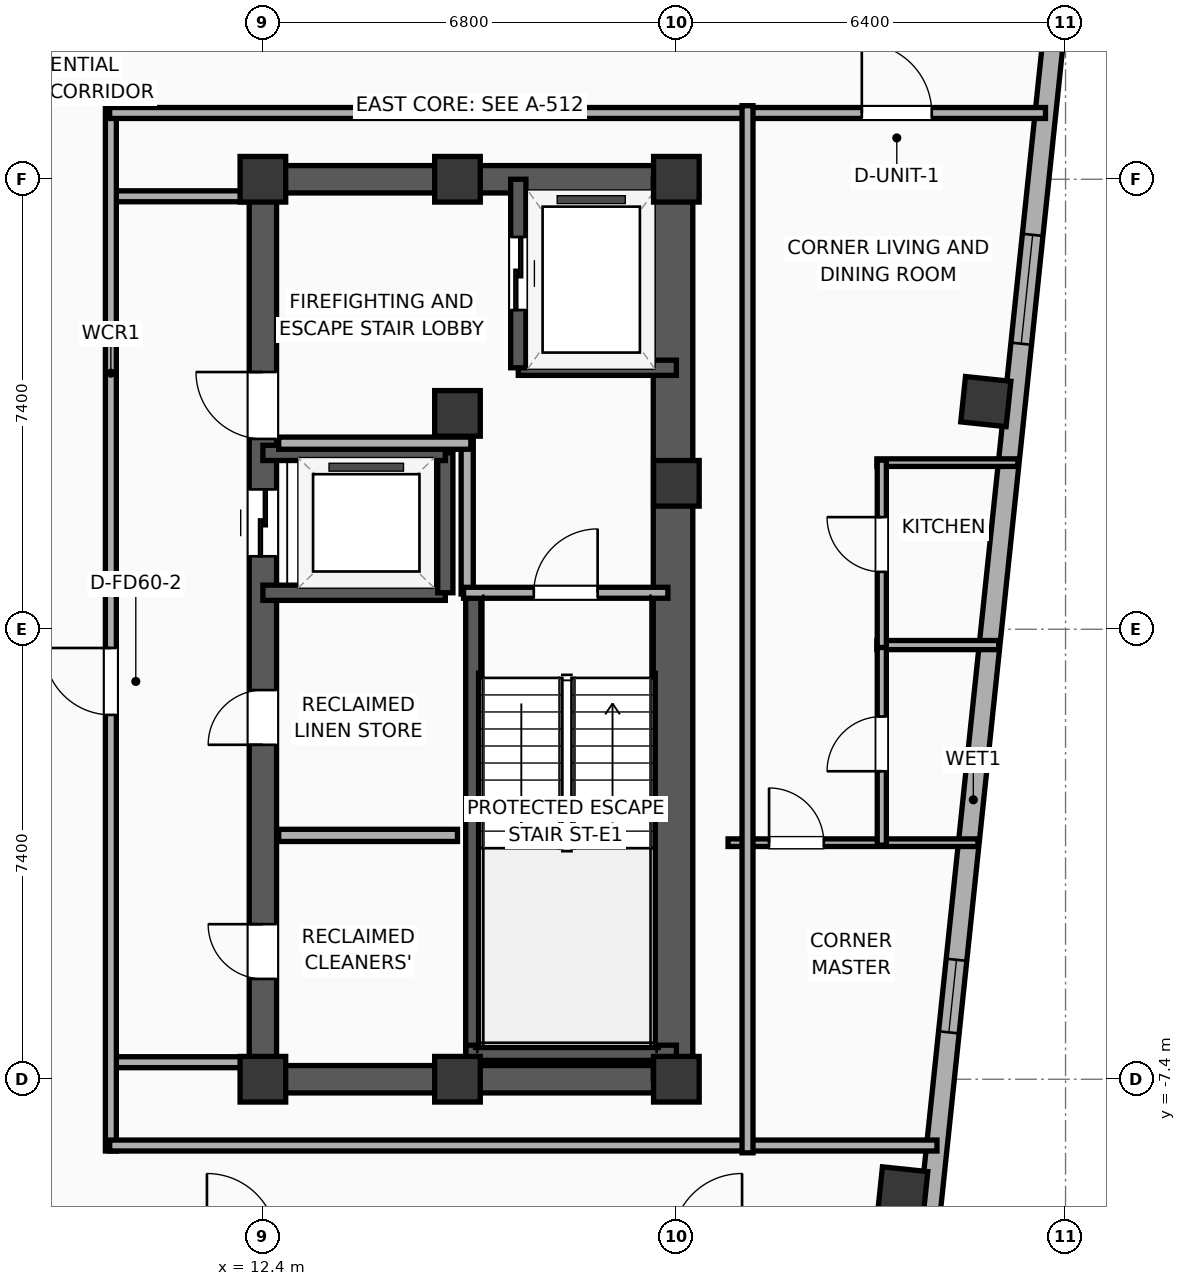
"""IFC4 building model, lengths in metres.
Left out: names, types, materials, properties, quantities, classifications, styles, units other than length and angle.
Written with IfcOpenShell. Run it as: python <this file> out.ifc"""

import sys

from ifc_helpers import new_model, si_unit, direction, frame, frame_2d, origin, origin_2d, place, context, subcontext, project, spatial, rectangle, hollow_rectangle, extrude, element, fill, save


model = new_model("IFC4")
c1 = context("Model", 3, precision=1e-05, world=origin(), true_north=direction((0.0, 1.0)))
c2 = subcontext(c1, "Body", "Model", "MODEL_VIEW")
j1 = project(units=[si_unit("LENGTHUNIT", "METRE"), si_unit("PLANEANGLEUNIT", "RADIAN")], contexts=[c1])
p1 = place(None, origin())
s1 = spatial("IfcSite", under=j1, at=p1, CompositionType="ELEMENT")
p2 = place(p1, origin())
s2 = spatial("IfcBuilding", under=s1, at=p2, CompositionType="ELEMENT")
p3 = place(p2, frame((0.0, 0.0, 271.7)))
s3 = spatial("IfcBuildingStorey", under=s2, at=p3, CompositionType="ELEMENT", Elevation=271.7)
for number, where, z_axis, x_axis in (
    (1, (12.4, -7.4, 0.0), (0.0, 0.0, 1.0), (1.0, 0.0, 0.0)),
    (2, (15.6, 3.55, 0.0), (0.0, 0.0, 1.0), (1.0, 0.0, 0.0)),
    (3, (12.4, 7.4, 0.0), (0.0, 0.0, 1.0), (1.0, 0.0, 0.0)),
    (4, (15.6, -7.4, 0.0), (0.0, 0.0, 1.0), (1.0, 0.0, 0.0)),
    (5, (15.6, 7.4, 0.0), (0.0, 0.0, 1.0), (1.0, 0.0, 0.0)),
    (6, (19.2, -7.4, 0.0), (0.0, 0.0, 1.0), (1.0, 0.0, 0.0)),
    (7, (19.2, 2.4, 0.0), (0.0, 0.0, 1.0), (1.0, 0.0, 0.0)),
    (8, (19.2, 7.4, 0.0), (0.0, 0.0, 1.0), (1.0, 0.0, 0.0)),
):
    element("IfcColumn", number, at=place(p3, frame(where, z_axis=z_axis, x_axis=x_axis)), inside=s3, PredefinedType="COLUMN", context=c2, shape_type="SweptSolid", body=[
        extrude(rectangle(XDim=0.75, YDim=0.75, at=origin_2d()), origin(), (0.0, 0.0, 1.0), 3.9),
    ])
for number, where, z_axis, x_axis in (
    (9, (12.175, -7.4, 0.0), (0.0, 0.0, 1.0), (1.0, 0.0, 0.0)),
    (10, (12.175, 7.4, 0.0), (0.0, 0.0, 1.0), (1.0, 0.0, 0.0)),
):
    element("IfcWall", number, at=place(p3, frame(where, z_axis=z_axis, x_axis=x_axis)), inside=s3, PredefinedType="SHEAR", context=c2, shape_type="SweptSolid", body=[
        extrude(rectangle(XDim=7.25, YDim=0.45, at=frame_2d((3.625, 0.0))), origin(), (0.0, 0.0, 1.0), 3.65),
    ])
p4 = place(p3, frame((12.4, -7.4, 0.0), z_axis=(0.0, 0.0, 1.0), x_axis=(0.0, 1.0, 0.0)))
e11 = element("IfcWall", 11, at=p4, inside=s3, PredefinedType="SHEAR", context=c2, shape_type="SweptSolid", body=[
    extrude(rectangle(XDim=14.8, YDim=0.45, at=frame_2d((7.4, 0.0))), origin(), (0.0, 0.0, 1.0), 3.65),
])
p5 = place(p4, frame((8.6, 0.0, 0.0)))
e12 = element("IfcOpeningElement", 12, at=p5, cuts=e11, PredefinedType="OPENING", context=c2, shape_type="SweptSolid", body=[
    extrude(rectangle(XDim=1.1, YDim=2.05, at=frame_2d((0.55, 1.025))), frame((0.0, 0.235, 0.0), z_axis=(0.0, -1.0, 0.0), x_axis=(1.0, 0.0, 0.0)), (0.0, 0.0, 1.0), 0.47),
])
p6 = place(p4, frame((10.53, 0.0, 0.0)))
e13 = element("IfcOpeningElement", 13, at=p6, cuts=e11, PredefinedType="OPENING", context=c2, shape_type="SweptSolid", body=[
    extrude(rectangle(XDim=1.1, YDim=2.05, at=frame_2d((0.55, 1.025))), frame((0.0, 0.235, 0.0), z_axis=(0.0, -1.0, 0.0), x_axis=(1.0, 0.0, 0.0)), (0.0, 0.0, 1.0), 0.47),
])
p7 = place(p4, frame((1.65, 0.0, 0.0)))
e14 = element("IfcOpeningElement", 14, at=p7, cuts=e11, PredefinedType="OPENING", context=c2, shape_type="SweptSolid", body=[
    extrude(rectangle(XDim=0.9, YDim=2.05, at=frame_2d((0.45, 1.025))), frame((0.0, 0.235, 0.0), z_axis=(0.0, -1.0, 0.0), x_axis=(1.0, 0.0, 0.0)), (0.0, 0.0, 1.0), 0.47),
])
p8 = place(p4, frame((5.5, 0.0, 0.0)))
e15 = element("IfcOpeningElement", 15, at=p8, cuts=e11, PredefinedType="OPENING", context=c2, shape_type="SweptSolid", body=[
    extrude(rectangle(XDim=0.9, YDim=2.05, at=frame_2d((0.45, 1.025))), frame((0.0, 0.235, 0.0), z_axis=(0.0, -1.0, 0.0), x_axis=(1.0, 0.0, 0.0)), (0.0, 0.0, 1.0), 0.47),
])
p9 = place(p3, frame((19.145, -7.4, 0.0), z_axis=(0.0, 0.0, 1.0), x_axis=(0.0, 1.0, 0.0)))
e16 = element("IfcWall", 16, at=p9, inside=s3, PredefinedType="SHEAR", context=c2, shape_type="SweptSolid", body=[
    extrude(rectangle(XDim=14.8, YDim=0.65, at=frame_2d((7.4, 0.0))), origin(), (0.0, 0.0, 1.0), 3.65),
])
p10 = place(p3, frame((15.86, -7.085, 0.0), z_axis=(0.0, 0.0, 1.0), x_axis=(0.0, 1.0, 0.0)))
e17 = element("IfcWall", 17, at=p10, inside=s3, PredefinedType="SOLIDWALL", context=c2, shape_type="SweptSolid", body=[
    extrude(rectangle(XDim=7.685, YDim=0.25, at=frame_2d((3.843, 0.0))), origin(), (0.0, 0.0, 1.0), 3.65),
])
p11 = place(p3, frame((15.74, -6.965, 0.0), z_axis=(0.0, 0.0, 1.0), x_axis=(1.0, 0.0, 0.0)))
e18 = element("IfcWall", 18, at=p11, inside=s3, PredefinedType="SOLIDWALL", context=c2, shape_type="SweptSolid", body=[
    extrude(rectangle(XDim=3.46, YDim=0.25, at=frame_2d((1.73, 0.0))), origin(), (0.0, 0.0, 1.0), 3.65),
])
for number, where, z_axis, x_axis in (
    (19, (22.923, -9.252, 0.0), (0.0, 0.0, 1.0), (0.995, -0.105, 0.0)),
    (20, (24.289, 3.744, 0.0), (0.0, 0.0, 1.0), (0.995, -0.105, 0.0)),
):
    element("IfcColumn", number, at=place(p3, frame(where, z_axis=z_axis, x_axis=x_axis)), inside=s3, PredefinedType="COLUMN", context=c2, shape_type="SweptSolid", body=[
        extrude(hollow_rectangle(XDim=0.75, YDim=0.75, WallThickness=0.025, at=origin_2d()), origin(), (0.0, 0.0, 1.0), 3.9),
    ])
p12 = place(p3, frame((25.67, 12.296, 0.0), z_axis=(0.0, 0.0, 1.0), x_axis=(-0.104533282919, -0.994521388791, 0.0)))
e21 = element("IfcWall", 21, at=p12, inside=s3, PredefinedType="ELEMENTEDWALL", context=c2, shape_type="SweptSolid", body=[
    extrude(rectangle(XDim=30.366, YDim=0.34, at=frame_2d((15.183, 0.0))), origin(), (0.0, 0.0, 1.0), 3.65),
])
p13 = place(p12, frame((5.842, 0.0, 0.75)))
e22 = element("IfcOpeningElement", 22, at=p13, cuts=e21, PredefinedType="OPENING", context=c2, shape_type="SweptSolid", body=[
    extrude(rectangle(XDim=1.8, YDim=2.1, at=frame_2d((0.9, 1.05))), frame((0.0, 0.18, 0.0), z_axis=(0.0, -1.0, 0.0), x_axis=(1.0, 0.0, 0.0)), (0.0, 0.0, 1.0), 0.36),
])
p14 = place(p12, frame((23.525, 0.0, 0.75)))
e23 = element("IfcOpeningElement", 23, at=p14, cuts=e21, PredefinedType="OPENING", context=c2, shape_type="SweptSolid", body=[
    extrude(rectangle(XDim=1.8, YDim=2.1, at=frame_2d((0.9, 1.05))), frame((0.0, 0.18, 0.0), z_axis=(0.0, -1.0, 0.0), x_axis=(1.0, 0.0, 0.0)), (0.0, 0.0, 1.0), 0.36),
])
p15 = place(p12, frame((27.017, 0.0, 0.75)))
e24 = element("IfcOpeningElement", 24, at=p15, cuts=e21, PredefinedType="OPENING", context=c2, shape_type="SweptSolid", body=[
    extrude(rectangle(XDim=1.2, YDim=2.05, at=frame_2d((0.6, 1.025))), frame((0.0, 0.18, 0.0), z_axis=(0.0, -1.0, 0.0), x_axis=(1.0, 0.0, 0.0)), (0.0, 0.0, 1.0), 0.36),
])
p16 = place(p12, frame((17.829, 0.0, 0.75)))
e25 = element("IfcOpeningElement", 25, at=p16, cuts=e21, PredefinedType="OPENING", context=c2, shape_type="SweptSolid", body=[
    extrude(rectangle(XDim=1.2, YDim=2.05, at=frame_2d((0.6, 1.025))), frame((0.0, 0.18, 0.0), z_axis=(0.0, -1.0, 0.0), x_axis=(1.0, 0.0, 0.0)), (0.0, 0.0, 1.0), 0.36),
])
p17 = place(p3, frame((16.6, 4.3, 0.0), z_axis=(0.0, 0.0, 1.0), x_axis=(1.0, 0.0, 0.0)))
e26 = element("IfcWall", 26, at=p17, inside=s3, PredefinedType="SOLIDWALL", context=c2, shape_type="SweptSolid", body=[
    extrude(rectangle(XDim=2.6, YDim=0.25, at=frame_2d((1.3, 0.0))), origin(), (0.0, 0.0, 1.0), 3.65),
])
p18 = place(p3, frame((16.6, 7.4, 0.0), z_axis=(0.0, 0.0, 1.0), x_axis=(0.0, -1.0, 0.0)))
e27 = element("IfcWall", 27, at=p18, inside=s3, PredefinedType="SOLIDWALL", context=c2, shape_type="SweptSolid", body=[
    extrude(rectangle(XDim=3.1, YDim=0.25, at=frame_2d((1.55, 0.0))), origin(), (0.0, 0.0, 1.0), 3.65),
])
p19 = place(p18, frame((0.95, 0.0, 0.0)))
e28 = element("IfcOpeningElement", 28, at=p19, cuts=e27, PredefinedType="OPENING", context=c2, shape_type="SweptSolid", body=[
    extrude(rectangle(XDim=1.2, YDim=2.05, at=frame_2d((0.6, 1.025))), frame((0.0, 0.135, 0.0), z_axis=(0.0, -1.0, 0.0), x_axis=(1.0, 0.0, 0.0)), (0.0, 0.0, 1.0), 0.27),
])
p20 = place(p3, frame((12.4, 0.6, 0.0), z_axis=(0.0, 0.0, 1.0), x_axis=(1.0, 0.0, 0.0)))
e29 = element("IfcWall", 29, at=p20, inside=s3, PredefinedType="SOLIDWALL", context=c2, shape_type="SweptSolid", body=[
    extrude(rectangle(XDim=3.0, YDim=0.25, at=frame_2d((1.5, 0.0))), origin(), (0.0, 0.0, 1.0), 3.65),
])
p21 = place(p3, frame((15.4, 0.6, 0.0), z_axis=(0.0, 0.0, 1.0), x_axis=(0.0, 1.0, 0.0)))
e30 = element("IfcWall", 30, at=p21, inside=s3, PredefinedType="SOLIDWALL", context=c2, shape_type="SweptSolid", body=[
    extrude(rectangle(XDim=2.3, YDim=0.25, at=frame_2d((1.15, 0.0))), origin(), (0.0, 0.0, 1.0), 3.65),
])
p22 = place(p3, frame((15.4, 2.9, 0.0), z_axis=(0.0, 0.0, 1.0), x_axis=(-1.0, 0.0, 0.0)))
e31 = element("IfcWall", 31, at=p22, inside=s3, PredefinedType="SOLIDWALL", context=c2, shape_type="SweptSolid", body=[
    extrude(rectangle(XDim=3.0, YDim=0.25, at=frame_2d((1.5, 0.0))), origin(), (0.0, 0.0, 1.0), 3.65),
])
p23 = place(p3, frame((15.76, 0.58, 0.0), z_axis=(0.0, 0.0, 1.0), x_axis=(0.0, 1.0, 0.0)))
e32 = element("IfcWall", 32, at=p23, inside=s3, PredefinedType="PARTITIONING", context=c2, shape_type="SweptSolid", body=[
    extrude(rectangle(XDim=2.52, YDim=0.2, at=frame_2d((1.26, 0.0))), origin(), (0.0, 0.0, 1.0), 3.65),
])
p24 = place(p3, frame((12.66, 3.06, 0.0), z_axis=(0.0, 0.0, 1.0), x_axis=(1.0, 0.0, 0.0)))
e33 = element("IfcWall", 33, at=p24, inside=s3, PredefinedType="PARTITIONING", context=c2, shape_type="SweptSolid", body=[
    extrude(rectangle(XDim=3.16, YDim=0.2, at=frame_2d((1.58, 0.0))), origin(), (0.0, 0.0, 1.0), 3.65),
])
p25 = place(p3, frame((15.7, 0.6, 0.0), z_axis=(0.0, 0.0, 1.0), x_axis=(1.0, 0.0, 0.0)))
e34 = element("IfcWall", 34, at=p25, inside=s3, PredefinedType="PARTITIONING", context=c2, shape_type="SweptSolid", body=[
    extrude(rectangle(XDim=3.36, YDim=0.18, at=frame_2d((1.68, 0.0))), origin(), (0.0, 0.0, 1.0), 3.65),
])
p26 = place(p25, frame((1.155, 0.0, 0.0)))
e35 = element("IfcOpeningElement", 35, at=p26, cuts=e34, PredefinedType="OPENING", context=c2, shape_type="SweptSolid", body=[
    extrude(rectangle(XDim=1.05, YDim=2.05, at=frame_2d((0.525, 1.025))), frame((0.0, 0.1, 0.0), z_axis=(0.0, -1.0, 0.0), x_axis=(1.0, 0.0, 0.0)), (0.0, 0.0, 1.0), 0.2),
])
p27 = place(p3, frame((12.66, -3.39, 0.0), z_axis=(0.0, 0.0, 1.0), x_axis=(1.0, 0.0, 0.0)))
e36 = element("IfcWall", 36, at=p27, inside=s3, PredefinedType="PARTITIONING", context=c2, shape_type="SweptSolid", body=[
    extrude(rectangle(XDim=2.94, YDim=0.2, at=frame_2d((1.47, 0.0))), origin(), (0.0, 0.0, 1.0), 3.65),
])
for number, where, z_axis, x_axis in (
    (37, (9.88, 7.12, 0.0), (0.0, 0.0, 1.0), (1.0, 0.0, 0.0)),
    (38, (9.88, -7.12, 0.0), (0.0, 0.0, 1.0), (1.0, 0.0, 0.0)),
):
    element("IfcWall", number, at=place(p3, frame(where, z_axis=z_axis, x_axis=x_axis)), inside=s3, PredefinedType="PARTITIONING", context=c2, shape_type="SweptSolid", body=[
        extrude(rectangle(XDim=2.27, YDim=0.18, at=frame_2d((1.135, 0.0))), origin(), (0.0, 0.0, 1.0), 3.65),
    ])
p28 = place(p3, frame((9.9, -8.58, 0.0), z_axis=(0.0, 0.0, 1.0), x_axis=(0.0, 1.0, 0.0)))
e39 = element("IfcWall", 39, at=p28, inside=s3, PredefinedType="PARTITIONING", context=c2, shape_type="SweptSolid", body=[
    extrude(rectangle(XDim=17.16, YDim=0.18, at=frame_2d((8.58, 0.0))), origin(), (0.0, 0.0, 1.0), 3.65),
])
p29 = place(p28, frame((7.172, 0.0, 0.0)))
e40 = element("IfcOpeningElement", 40, at=p29, cuts=e39, PredefinedType="OPENING", context=c2, shape_type="SweptSolid", body=[
    extrude(rectangle(XDim=1.1, YDim=2.05, at=frame_2d((0.55, 1.025))), frame((0.0, 0.1, 0.0), z_axis=(0.0, -1.0, 0.0), x_axis=(1.0, 0.0, 0.0)), (0.0, 0.0, 1.0), 0.2),
])
p30 = place(p3, frame((9.88, 8.49, 0.0), z_axis=(0.0, 0.0, 1.0), x_axis=(1.0, 0.0, 0.0)))
e41 = element("IfcWall", 41, at=p30, inside=s3, PredefinedType="PARTITIONING", context=c2, shape_type="SweptSolid", body=[
    extrude(rectangle(XDim=15.39, YDim=0.18, at=frame_2d((7.695, 0.0))), origin(), (0.0, 0.0, 1.0), 3.65),
])
p31 = place(p30, frame((12.37, 0.0, 0.0)))
e42 = element("IfcOpeningElement", 42, at=p31, cuts=e41, PredefinedType="OPENING", context=c2, shape_type="SweptSolid", body=[
    extrude(rectangle(XDim=1.15, YDim=2.05, at=frame_2d((0.575, 1.025))), frame((0.0, 0.1, 0.0), z_axis=(0.0, -1.0, 0.0), x_axis=(1.0, 0.0, 0.0)), (0.0, 0.0, 1.0), 0.2),
])
p32 = place(p3, frame((9.88, -8.49, 0.0), z_axis=(0.0, 0.0, 1.0), x_axis=(1.0, 0.0, 0.0)))
e43 = element("IfcWall", 43, at=p32, inside=s3, PredefinedType="PARTITIONING", context=c2, shape_type="SweptSolid", body=[
    extrude(rectangle(XDim=13.606, YDim=0.18, at=frame_2d((6.803, 0.0))), origin(), (0.0, 0.0, 1.0), 3.65),
])
p33 = place(p3, frame((22.498, 2.74, 0.0), z_axis=(0.0, 0.0, 1.0), x_axis=(1.0, 0.0, 0.0)))
e44 = element("IfcWall", 44, at=p33, inside=s3, PredefinedType="PARTITIONING", context=c2, shape_type="SweptSolid", body=[
    extrude(rectangle(XDim=2.319, YDim=0.125, at=frame_2d((1.159, 0.0))), origin(), (0.0, 0.0, 1.0), 3.65),
])
p34 = place(p3, frame((22.498, -0.26, 0.0), z_axis=(0.0, 0.0, 1.0), x_axis=(1.0, 0.0, 0.0)))
e45 = element("IfcWall", 45, at=p34, inside=s3, PredefinedType="PLUMBINGWALL", context=c2, shape_type="SweptSolid", body=[
    extrude(rectangle(XDim=2.003, YDim=0.15, at=frame_2d((1.001, 0.0))), origin(), (0.0, 0.0, 1.0), 3.65),
])
p35 = place(p3, frame((20.05, -3.51, 0.0), z_axis=(0.0, 0.0, 1.0), x_axis=(1.0, 0.0, 0.0)))
e46 = element("IfcWall", 46, at=p35, inside=s3, PredefinedType="PARTITIONING", context=c2, shape_type="SweptSolid", body=[
    extrude(rectangle(XDim=4.11, YDim=0.125, at=frame_2d((2.055, 0.0))), origin(), (0.0, 0.0, 1.0), 3.65),
])
p36 = place(p35, frame((0.674, 0.0, 0.0)))
e47 = element("IfcOpeningElement", 47, at=p36, cuts=e46, PredefinedType="OPENING", context=c2, shape_type="SweptSolid", body=[
    extrude(rectangle(XDim=0.9, YDim=2.05, at=frame_2d((0.45, 1.025))), frame((0.0, 0.073, 0.0), z_axis=(0.0, -1.0, 0.0), x_axis=(1.0, 0.0, 0.0)), (0.0, 0.0, 1.0), 0.145),
])
p37 = place(p3, frame((22.578, -3.55, 0.0), z_axis=(0.0, 0.0, 1.0), x_axis=(0.0, 1.0, 0.0)))
e48 = element("IfcWall", 48, at=p37, inside=s3, PredefinedType="PLUMBINGWALL", context=c2, shape_type="SweptSolid", body=[
    extrude(rectangle(XDim=3.33, YDim=0.15, at=frame_2d((1.665, 0.0))), origin(), (0.0, 0.0, 1.0), 3.65),
])
p38 = place(p37, frame((1.215, 0.0, 0.0)))
e49 = element("IfcOpeningElement", 49, at=p38, cuts=e48, PredefinedType="OPENING", context=c2, shape_type="SweptSolid", body=[
    extrude(rectangle(XDim=0.9, YDim=2.05, at=frame_2d((0.45, 1.025))), frame((0.0, 0.085, 0.0), z_axis=(0.0, -1.0, 0.0), x_axis=(1.0, 0.0, 0.0)), (0.0, 0.0, 1.0), 0.17),
])
p39 = place(p3, frame((22.578, -0.3, 0.0), z_axis=(0.0, 0.0, 1.0), x_axis=(0.0, 1.0, 0.0)))
e50 = element("IfcWall", 50, at=p39, inside=s3, PredefinedType="PLUMBINGWALL", context=c2, shape_type="SweptSolid", body=[
    extrude(rectangle(XDim=3.08, YDim=0.15, at=frame_2d((1.54, 0.0))), origin(), (0.0, 0.0, 1.0), 3.65),
])
p40 = place(p39, frame((1.244, 0.0, 0.0)))
e51 = element("IfcOpeningElement", 51, at=p40, cuts=e50, PredefinedType="OPENING", context=c2, shape_type="SweptSolid", body=[
    extrude(rectangle(XDim=0.9, YDim=2.05, at=frame_2d((0.45, 1.025))), frame((0.0, 0.085, 0.0), z_axis=(0.0, -1.0, 0.0), x_axis=(1.0, 0.0, 0.0)), (0.0, 0.0, 1.0), 0.17),
])
p41 = place(p3, frame((20.37, -8.61, 0.0), z_axis=(0.0, 0.0, 1.0), x_axis=(0.0, 1.0, 0.0)))
e52 = element("IfcWall", 52, at=p41, inside=s3, PredefinedType="PARTITIONING", context=c2, shape_type="SweptSolid", body=[
    extrude(rectangle(XDim=17.22, YDim=0.18, at=frame_2d((8.61, 0.0))), origin(), (0.0, 0.0, 1.0), 3.65),
])
p42 = place(p13, origin())
e53 = element("IfcWindow", 53, at=p42, inside=s3, PartitioningType="SINGLE_PANEL", PredefinedType="WINDOW", context=c2, shape_type="SweptSolid", body=[
    extrude(rectangle(XDim=1.8, YDim=2.1, at=frame_2d((0.9, 1.05))), frame((0.0, 0.03, 0.0), z_axis=(0.0, -1.0, 0.0), x_axis=(1.0, 0.0, 0.0)), (0.0, 0.0, 1.0), 0.06),
])
fill(e22, e53)
p43 = place(p16, origin())
e54 = element("IfcWindow", 54, at=p43, inside=s3, PartitioningType="SINGLE_PANEL", PredefinedType="WINDOW", context=c2, shape_type="SweptSolid", body=[
    extrude(rectangle(XDim=1.2, YDim=2.05, at=frame_2d((0.6, 1.025))), frame((0.0, 0.03, 0.0), z_axis=(0.0, -1.0, 0.0), x_axis=(1.0, 0.0, 0.0)), (0.0, 0.0, 1.0), 0.06),
])
fill(e25, e54)
p44 = place(p19, origin())
e55 = element("IfcDoor", 55, at=p44, inside=s3, OperationType="SLIDING_TO_LEFT", PredefinedType="DOOR", context=c2, shape_type="SweptSolid", body=[
    extrude(rectangle(XDim=1.2, YDim=2.05, at=frame_2d((0.6, 1.025))), frame((0.0, 0.025, 0.0), z_axis=(0.0, -1.0, 0.0), x_axis=(1.0, 0.0, 0.0)), (0.0, 0.0, 1.0), 0.05),
])
fill(e28, e55)
p45 = place(p5, origin())
e56 = element("IfcDoor", 56, at=p45, inside=s3, OperationType="SLIDING_TO_LEFT", PredefinedType="DOOR", context=c2, shape_type="SweptSolid", body=[
    extrude(rectangle(XDim=1.1, YDim=2.05, at=frame_2d((0.55, 1.025))), frame((0.0, 0.025, 0.0), z_axis=(0.0, -1.0, 0.0), x_axis=(1.0, 0.0, 0.0)), (0.0, 0.0, 1.0), 0.05),
])
fill(e12, e56)
p46 = place(p26, origin())
e57 = element("IfcDoor", 57, at=p46, inside=s3, OperationType="SINGLE_SWING_RIGHT", PredefinedType="DOOR", context=c2, shape_type="SweptSolid", body=[
    extrude(rectangle(XDim=1.05, YDim=2.05, at=frame_2d((0.525, 1.025))), frame((0.0, 0.025, 0.0), z_axis=(0.0, -1.0, 0.0), x_axis=(1.0, 0.0, 0.0)), (0.0, 0.0, 1.0), 0.05),
])
fill(e35, e57)
p47 = place(p29, origin())
e58 = element("IfcDoor", 58, at=p47, inside=s3, OperationType="SINGLE_SWING_RIGHT", PredefinedType="DOOR", context=c2, shape_type="SweptSolid", body=[
    extrude(rectangle(XDim=1.1, YDim=2.05, at=frame_2d((0.55, 1.025))), frame((0.0, 0.025, 0.0), z_axis=(0.0, -1.0, 0.0), x_axis=(1.0, 0.0, 0.0)), (0.0, 0.0, 1.0), 0.05),
])
fill(e40, e58)
p48 = place(p31, origin())
e59 = element("IfcDoor", 59, at=p48, inside=s3, OperationType="SINGLE_SWING_LEFT", PredefinedType="DOOR", context=c2, shape_type="SweptSolid", body=[
    extrude(rectangle(XDim=1.15, YDim=2.05, at=frame_2d((0.575, 1.025))), frame((0.0, 0.025, 0.0), z_axis=(0.0, -1.0, 0.0), x_axis=(1.0, 0.0, 0.0)), (0.0, 0.0, 1.0), 0.05),
])
fill(e42, e59)
p49 = place(p36, origin())
e60 = element("IfcDoor", 60, at=p49, inside=s3, OperationType="SINGLE_SWING_LEFT", PredefinedType="DOOR", context=c2, shape_type="SweptSolid", body=[
    extrude(rectangle(XDim=0.9, YDim=2.05, at=frame_2d((0.45, 1.025))), frame((0.0, 0.025, 0.0), z_axis=(0.0, -1.0, 0.0), x_axis=(1.0, 0.0, 0.0)), (0.0, 0.0, 1.0), 0.05),
])
fill(e47, e60)
p50 = place(p38, origin())
e61 = element("IfcDoor", 61, at=p50, inside=s3, OperationType="SINGLE_SWING_LEFT", PredefinedType="DOOR", context=c2, shape_type="SweptSolid", body=[
    extrude(rectangle(XDim=0.9, YDim=2.05, at=frame_2d((0.45, 1.025))), frame((0.0, 0.025, 0.0), z_axis=(0.0, -1.0, 0.0), x_axis=(1.0, 0.0, 0.0)), (0.0, 0.0, 1.0), 0.05),
])
fill(e49, e61)
p51 = place(p40, origin())
e62 = element("IfcDoor", 62, at=p51, inside=s3, OperationType="SINGLE_SWING_RIGHT", PredefinedType="DOOR", context=c2, shape_type="SweptSolid", body=[
    extrude(rectangle(XDim=0.9, YDim=2.05, at=frame_2d((0.45, 1.025))), frame((0.0, 0.025, 0.0), z_axis=(0.0, -1.0, 0.0), x_axis=(1.0, 0.0, 0.0)), (0.0, 0.0, 1.0), 0.05),
])
fill(e51, e62)
p52 = place(p6, origin())
e63 = element("IfcDoor", 63, at=p52, inside=s3, OperationType="SINGLE_SWING_RIGHT", PredefinedType="DOOR", context=c2, shape_type="SweptSolid", body=[
    extrude(rectangle(XDim=1.1, YDim=2.05, at=frame_2d((0.55, 1.025))), frame((0.0, 0.025, 0.0), z_axis=(0.0, -1.0, 0.0), x_axis=(1.0, 0.0, 0.0)), (0.0, 0.0, 1.0), 0.05),
])
fill(e13, e63)
p53 = place(p7, origin())
e64 = element("IfcDoor", 64, at=p53, inside=s3, OperationType="SINGLE_SWING_RIGHT", PredefinedType="DOOR", context=c2, shape_type="SweptSolid", body=[
    extrude(rectangle(XDim=0.9, YDim=2.05, at=frame_2d((0.45, 1.025))), frame((0.0, 0.025, 0.0), z_axis=(0.0, -1.0, 0.0), x_axis=(1.0, 0.0, 0.0)), (0.0, 0.0, 1.0), 0.05),
])
fill(e14, e64)
p54 = place(p8, origin())
e65 = element("IfcDoor", 65, at=p54, inside=s3, OperationType="SINGLE_SWING_LEFT", PredefinedType="DOOR", context=c2, shape_type="SweptSolid", body=[
    extrude(rectangle(XDim=0.9, YDim=2.05, at=frame_2d((0.45, 1.025))), frame((0.0, 0.025, 0.0), z_axis=(0.0, -1.0, 0.0), x_axis=(1.0, 0.0, 0.0)), (0.0, 0.0, 1.0), 0.05),
])
fill(e15, e65)
save(model, sys.argv[1])
